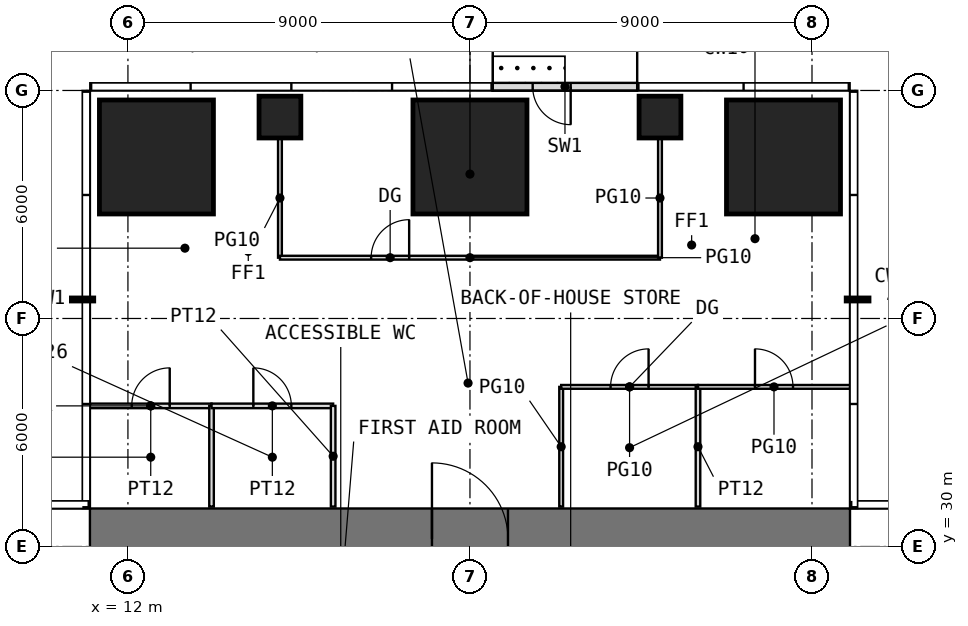
"""IFC4 building model, lengths in metres.
Left out: names, types, materials, properties, quantities, classifications, styles, units other than length and angle.
Written with IfcOpenShell. Run it as: python <this file> out.ifc"""

import sys

from ifc_helpers import new_model, si_unit, direction, frame, frame_2d, origin, origin_2d, place, context, subcontext, project, spatial, rectangle, extrude, element, fill, save


model = new_model("IFC4")
c1 = context("Model", 3, precision=1e-05, world=origin(), true_north=direction((0.0, 1.0)))
c2 = subcontext(c1, "Body", "Model", "MODEL_VIEW")
j1 = project(units=[si_unit("LENGTHUNIT", "METRE"), si_unit("PLANEANGLEUNIT", "RADIAN")], contexts=[c1])
p1 = place(None, origin())
s1 = spatial("IfcSite", under=j1, at=p1, CompositionType="ELEMENT")
p2 = place(p1, origin())
s2 = spatial("IfcBuilding", under=s1, at=p2, CompositionType="ELEMENT")
p3 = place(p2, frame((0.0, 0.0, 128.5)))
s3 = spatial("IfcBuildingStorey", under=s2, at=p3, CompositionType="ELEMENT", Elevation=128.5)
p4 = place(p3, frame((12.75, 40.25, 0.0), z_axis=(0.0, 0.0, 1.0), x_axis=(1.0, 0.0, 0.0)))
e1 = element("IfcColumn", 1, at=p4, inside=s3, PredefinedType="COLUMN", context=c2, shape_type="SweptSolid", body=[
    extrude(rectangle(XDim=3.0, YDim=3.0, at=origin_2d()), origin(), (0.0, 0.0, 1.0), 4.0),
])
p5 = place(p3, frame((16.0, 41.3, 0.0), z_axis=(0.0, 0.0, 1.0), x_axis=(1.0, 0.0, 0.0)))
e2 = element("IfcColumn", 2, at=p5, inside=s3, PredefinedType="COLUMN", context=c2, shape_type="SweptSolid", body=[
    extrude(rectangle(XDim=1.1, YDim=1.1, at=origin_2d()), origin(), (0.0, 0.0, 1.0), 4.0),
])
p6 = place(p3, frame((21.0, 40.25, 0.0), z_axis=(0.0, 0.0, 1.0), x_axis=(1.0, 0.0, 0.0)))
e3 = element("IfcColumn", 3, at=p6, inside=s3, PredefinedType="COLUMN", context=c2, shape_type="SweptSolid", body=[
    extrude(rectangle(XDim=3.0, YDim=3.0, at=origin_2d()), origin(), (0.0, 0.0, 1.0), 4.0),
])
p7 = place(p3, frame((26.0, 41.3, 0.0), z_axis=(0.0, 0.0, 1.0), x_axis=(1.0, 0.0, 0.0)))
e4 = element("IfcColumn", 4, at=p7, inside=s3, PredefinedType="COLUMN", context=c2, shape_type="SweptSolid", body=[
    extrude(rectangle(XDim=1.1, YDim=1.1, at=origin_2d()), origin(), (0.0, 0.0, 1.0), 4.0),
])
p8 = place(p3, frame((29.25, 40.25, 0.0), z_axis=(0.0, 0.0, 1.0), x_axis=(1.0, 0.0, 0.0)))
e5 = element("IfcColumn", 5, at=p8, inside=s3, PredefinedType="COLUMN", context=c2, shape_type="SweptSolid", body=[
    extrude(rectangle(XDim=3.0, YDim=3.0, at=origin_2d()), origin(), (0.0, 0.0, 1.0), 4.0),
])
p9 = place(p3, frame((25.4, 42.1, 0.0), z_axis=(0.0, 0.0, 1.0), x_axis=(-1.0, 0.0, 0.0)))
e6 = element("IfcWall", 6, at=p9, inside=s3, PredefinedType="USERDEFINED", context=c2, shape_type="SweptSolid", body=[
    extrude(rectangle(XDim=3.8, YDim=0.2, at=frame_2d((1.9, 0.0))), origin(), (0.0, 0.0, 1.0), 3.75),
])
p10 = place(p9, frame((1.75, 0.0, 0.0)))
e7 = element("IfcOpeningElement", 7, at=p10, cuts=e6, PredefinedType="OPENING", context=c2, shape_type="SweptSolid", body=[
    extrude(rectangle(XDim=1.0, YDim=2.4, at=frame_2d((0.5, 1.2))), frame((0.0, 0.11, 0.0), z_axis=(0.0, -1.0, 0.0), x_axis=(1.0, 0.0, 0.0)), (0.0, 0.0, 1.0), 0.22),
])
p11 = place(p3, frame((11.0, 30.2, -0.05), z_axis=(0.0, 0.0, 1.0), x_axis=(1.0, 0.0, 0.0)))
e8 = element("IfcWall", 8, at=p11, inside=s3, PredefinedType="SHEAR", context=c2, shape_type="SweptSolid", body=[
    extrude(rectangle(XDim=20.0, YDim=1.6, at=frame_2d((10.0, 0.0))), origin(), (0.0, 0.0, 1.0), 4.0),
])
p12 = place(p11, frame((9.0, 0.0, 0.05)))
e9 = element("IfcOpeningElement", 9, at=p12, cuts=e8, PredefinedType="OPENING", context=c2, shape_type="SweptSolid", body=[
    extrude(rectangle(XDim=2.0, YDim=2.2, at=frame_2d((1.0, 1.1))), frame((0.0, 0.81, 0.0), z_axis=(0.0, -1.0, 0.0), x_axis=(1.0, 0.0, 0.0)), (0.0, 0.0, 1.0), 1.62),
])
p13 = place(p3, frame((11.0, 33.7, 0.0), z_axis=(0.0, 0.0, 1.0), x_axis=(1.0, 0.0, 0.0)))
e10 = element("IfcWall", 10, at=p13, inside=s3, PredefinedType="PARTITIONING", context=c2, shape_type="SweptSolid", body=[
    extrude(rectangle(XDim=3.2, YDim=0.12, at=frame_2d((1.6, 0.0))), origin(), (0.0, 0.0, 1.0), 3.75),
])
p14 = place(p13, frame((1.1, 0.0, 0.0)))
e11 = element("IfcOpeningElement", 11, at=p14, cuts=e10, PredefinedType="OPENING", context=c2, shape_type="SweptSolid", body=[
    extrude(rectangle(XDim=1.0, YDim=2.2, at=frame_2d((0.5, 1.1))), frame((0.0, 0.07, 0.0), z_axis=(0.0, -1.0, 0.0), x_axis=(1.0, 0.0, 0.0)), (0.0, 0.0, 1.0), 0.14),
])
p15 = place(p3, frame((14.2, 31.05, 0.0), z_axis=(0.0, 0.0, 1.0), x_axis=(0.0, 1.0, 0.0)))
e12 = element("IfcWall", 12, at=p15, inside=s3, PredefinedType="PARTITIONING", context=c2, shape_type="SweptSolid", body=[
    extrude(rectangle(XDim=2.65, YDim=0.12, at=frame_2d((1.325, 0.0))), origin(), (0.0, 0.0, 1.0), 3.75),
])
p16 = place(p3, frame((14.2, 33.7, 0.0), z_axis=(0.0, 0.0, 1.0), x_axis=(1.0, 0.0, 0.0)))
e13 = element("IfcWall", 13, at=p16, inside=s3, PredefinedType="PARTITIONING", context=c2, shape_type="SweptSolid", body=[
    extrude(rectangle(XDim=3.2, YDim=0.12, at=frame_2d((1.6, 0.0))), origin(), (0.0, 0.0, 1.0), 3.75),
])
p17 = place(p16, frame((1.1, 0.0, 0.0)))
e14 = element("IfcOpeningElement", 14, at=p17, cuts=e13, PredefinedType="OPENING", context=c2, shape_type="SweptSolid", body=[
    extrude(rectangle(XDim=1.0, YDim=2.2, at=frame_2d((0.5, 1.1))), frame((0.0, 0.07, 0.0), z_axis=(0.0, -1.0, 0.0), x_axis=(1.0, 0.0, 0.0)), (0.0, 0.0, 1.0), 0.14),
])
p18 = place(p3, frame((16.0, 37.6, 0.0), z_axis=(0.0, 0.0, 1.0), x_axis=(0.0, 1.0, 0.0)))
e15 = element("IfcWall", 15, at=p18, inside=s3, PredefinedType="PARTITIONING", context=c2, shape_type="SweptSolid", body=[
    extrude(rectangle(XDim=3.14, YDim=0.1, at=frame_2d((1.57, 0.0))), origin(), (0.0, 0.0, 1.0), 3.75),
])
p19 = place(p3, frame((16.0, 37.6, 0.0), z_axis=(0.0, 0.0, 1.0), x_axis=(1.0, 0.0, 0.0)))
e16 = element("IfcWall", 16, at=p19, inside=s3, PredefinedType="PARTITIONING", context=c2, shape_type="SweptSolid", body=[
    extrude(rectangle(XDim=10.0, YDim=0.1, at=frame_2d((5.0, 0.0))), origin(), (0.0, 0.0, 1.0), 3.75),
])
p20 = place(p19, frame((2.4, 0.0, 0.0)))
e17 = element("IfcOpeningElement", 17, at=p20, cuts=e16, PredefinedType="OPENING", context=c2, shape_type="SweptSolid", body=[
    extrude(rectangle(XDim=1.0, YDim=2.4, at=frame_2d((0.5, 1.2))), frame((0.0, 0.06, 0.0), z_axis=(0.0, -1.0, 0.0), x_axis=(1.0, 0.0, 0.0)), (0.0, 0.0, 1.0), 0.12),
])
p21 = place(p3, frame((17.4, 31.05, 0.0), z_axis=(0.0, 0.0, 1.0), x_axis=(0.0, 1.0, 0.0)))
e18 = element("IfcWall", 18, at=p21, inside=s3, PredefinedType="PARTITIONING", context=c2, shape_type="SweptSolid", body=[
    extrude(rectangle(XDim=2.65, YDim=0.12, at=frame_2d((1.325, 0.0))), origin(), (0.0, 0.0, 1.0), 3.75),
])
p22 = place(p3, frame((23.4, 31.05, 0.0), z_axis=(0.0, 0.0, 1.0), x_axis=(0.0, 1.0, 0.0)))
e19 = element("IfcWall", 19, at=p22, inside=s3, PredefinedType="PARTITIONING", context=c2, shape_type="SweptSolid", body=[
    extrude(rectangle(XDim=3.15, YDim=0.1, at=frame_2d((1.575, 0.0))), origin(), (0.0, 0.0, 1.0), 3.75),
])
p23 = place(p3, frame((23.4, 34.2, 0.0), z_axis=(0.0, 0.0, 1.0), x_axis=(1.0, 0.0, 0.0)))
e20 = element("IfcWall", 20, at=p23, inside=s3, PredefinedType="PARTITIONING", context=c2, shape_type="SweptSolid", body=[
    extrude(rectangle(XDim=3.6, YDim=0.1, at=frame_2d((1.8, 0.0))), origin(), (0.0, 0.0, 1.0), 3.75),
])
p24 = place(p23, frame((1.3, 0.0, 0.0)))
e21 = element("IfcOpeningElement", 21, at=p24, cuts=e20, PredefinedType="OPENING", context=c2, shape_type="SweptSolid", body=[
    extrude(rectangle(XDim=1.0, YDim=2.4, at=frame_2d((0.5, 1.2))), frame((0.0, 0.06, 0.0), z_axis=(0.0, -1.0, 0.0), x_axis=(1.0, 0.0, 0.0)), (0.0, 0.0, 1.0), 0.12),
])
p25 = place(p3, frame((26.0, 37.6, 0.0), z_axis=(0.0, 0.0, 1.0), x_axis=(0.0, 1.0, 0.0)))
e22 = element("IfcWall", 22, at=p25, inside=s3, PredefinedType="PARTITIONING", context=c2, shape_type="SweptSolid", body=[
    extrude(rectangle(XDim=3.14, YDim=0.1, at=frame_2d((1.57, 0.0))), origin(), (0.0, 0.0, 1.0), 3.75),
])
p26 = place(p3, frame((27.0, 31.05, 0.0), z_axis=(0.0, 0.0, 1.0), x_axis=(0.0, 1.0, 0.0)))
e23 = element("IfcWall", 23, at=p26, inside=s3, PredefinedType="PARTITIONING", context=c2, shape_type="SweptSolid", body=[
    extrude(rectangle(XDim=3.15, YDim=0.12, at=frame_2d((1.575, 0.0))), origin(), (0.0, 0.0, 1.0), 3.75),
])
p27 = place(p3, frame((27.0, 34.2, 0.0), z_axis=(0.0, 0.0, 1.0), x_axis=(1.0, 0.0, 0.0)))
e24 = element("IfcWall", 24, at=p27, inside=s3, PredefinedType="PARTITIONING", context=c2, shape_type="SweptSolid", body=[
    extrude(rectangle(XDim=4.0, YDim=0.1, at=frame_2d((2.0, 0.0))), origin(), (0.0, 0.0, 1.0), 3.75),
])
p28 = place(p27, frame((1.5, 0.0, 0.0)))
e25 = element("IfcOpeningElement", 25, at=p28, cuts=e24, PredefinedType="OPENING", context=c2, shape_type="SweptSolid", body=[
    extrude(rectangle(XDim=1.0, YDim=2.4, at=frame_2d((0.5, 1.2))), frame((0.0, 0.06, 0.0), z_axis=(0.0, -1.0, 0.0), x_axis=(1.0, 0.0, 0.0)), (0.0, 0.0, 1.0), 0.12),
])
p29 = place(p10, origin())
e26 = element("IfcDoor", 26, at=p29, inside=s3, OperationType="SINGLE_SWING_LEFT", PredefinedType="DOOR", context=c2, shape_type="SweptSolid", body=[
    extrude(rectangle(XDim=1.0, YDim=2.4, at=frame_2d((0.5, 1.2))), frame((0.0, 0.025, 0.0), z_axis=(0.0, -1.0, 0.0), x_axis=(1.0, 0.0, 0.0)), (0.0, 0.0, 1.0), 0.05),
])
fill(e7, e26)
p30 = place(p12, origin())
e27 = element("IfcDoor", 27, at=p30, inside=s3, OperationType="DOUBLE_DOOR_SINGLE_SWING", PredefinedType="DOOR", context=c2, shape_type="SweptSolid", body=[
    extrude(rectangle(XDim=2.0, YDim=2.2, at=frame_2d((1.0, 1.1))), frame((0.0, 0.025, 0.0), z_axis=(0.0, -1.0, 0.0), x_axis=(1.0, 0.0, 0.0)), (0.0, 0.0, 1.0), 0.05),
])
fill(e9, e27)
p31 = place(p14, origin())
e28 = element("IfcDoor", 28, at=p31, inside=s3, OperationType="SINGLE_SWING_RIGHT", PredefinedType="DOOR", context=c2, shape_type="SweptSolid", body=[
    extrude(rectangle(XDim=1.0, YDim=2.2, at=frame_2d((0.5, 1.1))), frame((0.0, 0.025, 0.0), z_axis=(0.0, -1.0, 0.0), x_axis=(1.0, 0.0, 0.0)), (0.0, 0.0, 1.0), 0.05),
])
fill(e11, e28)
p32 = place(p17, origin())
e29 = element("IfcDoor", 29, at=p32, inside=s3, OperationType="SINGLE_SWING_LEFT", PredefinedType="DOOR", context=c2, shape_type="SweptSolid", body=[
    extrude(rectangle(XDim=1.0, YDim=2.2, at=frame_2d((0.5, 1.1))), frame((0.0, 0.025, 0.0), z_axis=(0.0, -1.0, 0.0), x_axis=(1.0, 0.0, 0.0)), (0.0, 0.0, 1.0), 0.05),
])
fill(e14, e29)
p33 = place(p24, origin())
e30 = element("IfcDoor", 30, at=p33, inside=s3, OperationType="SINGLE_SWING_RIGHT", PredefinedType="DOOR", context=c2, shape_type="SweptSolid", body=[
    extrude(rectangle(XDim=1.0, YDim=2.4, at=frame_2d((0.5, 1.2))), frame((0.0, 0.025, 0.0), z_axis=(0.0, -1.0, 0.0), x_axis=(1.0, 0.0, 0.0)), (0.0, 0.0, 1.0), 0.05),
])
fill(e21, e30)
p34 = place(p28, origin())
e31 = element("IfcDoor", 31, at=p34, inside=s3, OperationType="SINGLE_SWING_LEFT", PredefinedType="DOOR", context=c2, shape_type="SweptSolid", body=[
    extrude(rectangle(XDim=1.0, YDim=2.4, at=frame_2d((0.5, 1.2))), frame((0.0, 0.025, 0.0), z_axis=(0.0, -1.0, 0.0), x_axis=(1.0, 0.0, 0.0)), (0.0, 0.0, 1.0), 0.05),
])
fill(e25, e31)
p35 = place(p20, origin())
e32 = element("IfcDoor", 32, at=p35, inside=s3, OperationType="SINGLE_SWING_RIGHT", PredefinedType="DOOR", context=c2, shape_type="SweptSolid", body=[
    extrude(rectangle(XDim=1.0, YDim=2.4, at=frame_2d((0.5, 1.2))), frame((0.0, 0.025, 0.0), z_axis=(0.0, -1.0, 0.0), x_axis=(1.0, 0.0, 0.0)), (0.0, 0.0, 1.0), 0.05),
])
fill(e17, e32)
save(model, sys.argv[1])
